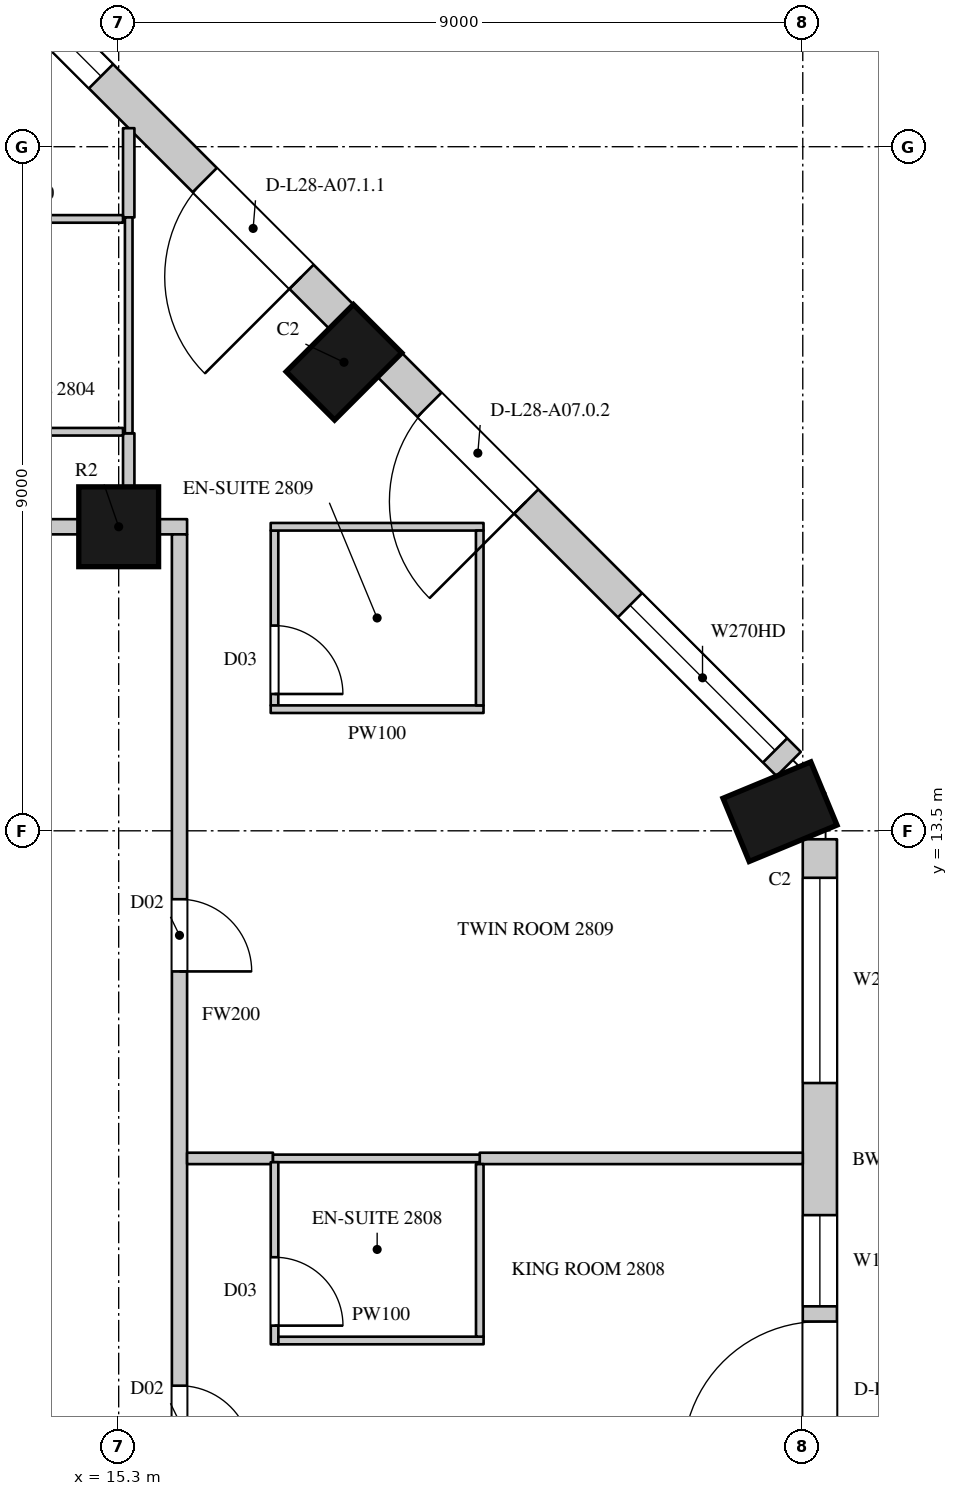
"""IFC4 building model, lengths in metres.
Left out: names, types, materials, properties, quantities, classifications, styles, units other than length and angle.
Written with IfcOpenShell. Run it as: python <this file> out.ifc"""

import sys

from ifc_helpers import new_model, si_unit, direction, frame, frame_2d, origin, origin_2d, place, context, subcontext, project, spatial, rectangle, circle, extrude, element, fill, save


model = new_model("IFC4")
c1 = context("Model", 3, precision=1e-05, world=origin(), true_north=direction((0.0, 1.0)))
c2 = subcontext(c1, "Body", "Model", "MODEL_VIEW")
j1 = project(units=[si_unit("LENGTHUNIT", "METRE"), si_unit("PLANEANGLEUNIT", "RADIAN")], contexts=[c1])
p1 = place(None, origin())
s1 = spatial("IfcSite", under=j1, at=p1, CompositionType="ELEMENT")
p2 = place(p1, origin())
s2 = spatial("IfcBuilding", under=s1, at=p2, CompositionType="ELEMENT")
p3 = place(p2, frame((0.0, 0.0, 131.1)))
s3 = spatial("IfcBuildingStorey", under=s2, at=p3, CompositionType="ELEMENT", Elevation=131.1)
for number, where, z_axis, x_axis in (
    (1, (24.0, 13.752, 0.0), (0.0, 0.0, 1.0), (-0.383, 0.924, 0.0)),
    (2, (18.264, 19.664, 0.0), (0.0, 0.0, 1.0), (-0.707, 0.707, 0.0)),
):
    element("IfcColumn", number, at=place(p3, frame(where, z_axis=z_axis, x_axis=x_axis)), inside=s3, PredefinedType="COLUMN", context=c2, shape_type="SweptSolid", body=[
        extrude(rectangle(XDim=0.9, YDim=1.25, at=origin_2d()), origin(), (0.0, 0.0, 1.0), 3.6),
    ])
p4 = place(p3, frame((15.3, 17.5, 0.0), z_axis=(0.0, 0.0, 1.0), x_axis=(1.0, 0.0, 0.0)))
e3 = element("IfcColumn", 3, at=p4, inside=s3, PredefinedType="COLUMN", context=c2, shape_type="SweptSolid", body=[
    extrude(circle(Radius=0.525, at=origin_2d()), origin(), (0.0, 0.0, 1.0), 3.6),
])
p5 = place(p3, frame((24.525, 4.95, 0.0), z_axis=(0.0, 0.0, 1.0), x_axis=(0.0, 1.0, 0.0)))
e4 = element("IfcWall", 4, at=p5, inside=s3, PredefinedType="SOLIDWALL", context=c2, shape_type="SweptSolid", body=[
    extrude(rectangle(XDim=8.439, YDim=0.45, at=frame_2d((4.219, 0.0))), origin(), (0.0, 0.0, 1.0), 3.3),
])
p6 = place(p5, frame((0.294, 0.0, 0.0)))
e5 = element("IfcOpeningElement", 5, at=p6, cuts=e4, PredefinedType="OPENING", context=c2, shape_type="SweptSolid", body=[
    extrude(rectangle(XDim=1.8, YDim=2.4, at=frame_2d((0.9, 1.2))), frame((0.0, 0.235, 0.0), z_axis=(0.0, -1.0, 0.0), x_axis=(1.0, 0.0, 0.0)), (0.0, 0.0, 1.0), 0.47),
])
p7 = place(p5, frame((2.294, 0.0, 1.05)))
e6 = element("IfcOpeningElement", 6, at=p7, cuts=e4, PredefinedType="OPENING", context=c2, shape_type="SweptSolid", body=[
    extrude(rectangle(XDim=1.2, YDim=2.0, at=frame_2d((0.6, 1.0))), frame((0.0, 0.235, 0.0), z_axis=(0.0, -1.0, 0.0), x_axis=(1.0, 0.0, 0.0)), (0.0, 0.0, 1.0), 0.47),
])
p8 = place(p5, frame((5.232, 0.0, 1.05)))
e7 = element("IfcOpeningElement", 7, at=p8, cuts=e4, PredefinedType="OPENING", context=c2, shape_type="SweptSolid", body=[
    extrude(rectangle(XDim=2.7, YDim=2.0, at=frame_2d((1.35, 1.0))), frame((0.0, 0.235, 0.0), z_axis=(0.0, -1.0, 0.0), x_axis=(1.0, 0.0, 0.0)), (0.0, 0.0, 1.0), 0.47),
])
p9 = place(p3, frame((24.115, 14.379, 0.0), z_axis=(0.0, 0.0, 1.0), x_axis=(-0.707106781187, 0.707106781187, 0.0)))
e8 = element("IfcWall", 8, at=p9, inside=s3, PredefinedType="SOLIDWALL", context=c2, shape_type="SweptSolid", body=[
    extrude(rectangle(XDim=7.424, YDim=0.45, at=frame_2d((3.712, 0.0))), origin(), (0.0, 0.0, 1.0), 3.3),
])
p10 = place(p9, frame((0.253, 0.0, 1.05)))
e9 = element("IfcOpeningElement", 9, at=p10, cuts=e8, PredefinedType="OPENING", context=c2, shape_type="SweptSolid", body=[
    extrude(rectangle(XDim=2.7, YDim=2.0, at=frame_2d((1.35, 1.0))), frame((0.0, 0.235, 0.0), z_axis=(0.0, -1.0, 0.0), x_axis=(1.0, 0.0, 0.0)), (0.0, 0.0, 1.0), 0.47),
])
p11 = place(p9, frame((4.884, 0.0, 0.0)))
e10 = element("IfcOpeningElement", 10, at=p11, cuts=e8, PredefinedType="OPENING", context=c2, shape_type="SweptSolid", body=[
    extrude(rectangle(XDim=1.8, YDim=2.4, at=frame_2d((0.9, 1.2))), frame((0.0, 0.235, 0.0), z_axis=(0.0, -1.0, 0.0), x_axis=(1.0, 0.0, 0.0)), (0.0, 0.0, 1.0), 0.47),
])
p12 = place(p3, frame((18.229, 20.265, 0.0), z_axis=(0.0, 0.0, 1.0), x_axis=(-0.707106781187, 0.707106781187, 0.0)))
e11 = element("IfcWall", 11, at=p12, inside=s3, PredefinedType="SOLIDWALL", context=c2, shape_type="SweptSolid", body=[
    extrude(rectangle(XDim=7.424, YDim=0.45, at=frame_2d((3.712, 0.0))), origin(), (0.0, 0.0, 1.0), 3.3),
])
p13 = place(p12, frame((0.74, 0.0, 0.0)))
e12 = element("IfcOpeningElement", 12, at=p13, cuts=e11, PredefinedType="OPENING", context=c2, shape_type="SweptSolid", body=[
    extrude(rectangle(XDim=1.8, YDim=2.4, at=frame_2d((0.9, 1.2))), frame((0.0, 0.235, 0.0), z_axis=(0.0, -1.0, 0.0), x_axis=(1.0, 0.0, 0.0)), (0.0, 0.0, 1.0), 0.47),
])
p14 = place(p12, frame((4.471, 0.0, 1.05)))
e13 = element("IfcOpeningElement", 13, at=p14, cuts=e11, PredefinedType="OPENING", context=c2, shape_type="SweptSolid", body=[
    extrude(rectangle(XDim=2.7, YDim=2.0, at=frame_2d((1.35, 1.0))), frame((0.0, 0.235, 0.0), z_axis=(0.0, -1.0, 0.0), x_axis=(1.0, 0.0, 0.0)), (0.0, 0.0, 1.0), 0.47),
])
p15 = place(p3, frame((23.15, 16.864, 0.0), z_axis=(0.0, 0.0, 1.0), x_axis=(-0.707106781187, 0.707106781187, 0.0)))
e14 = element("IfcWall", 14, at=p15, inside=s3, PredefinedType="SOLIDWALL", context=c2, shape_type="SweptSolid", body=[
    extrude(rectangle(XDim=1.445, YDim=0.45, at=frame_2d((0.722, 0.0))), origin(), (0.0, 0.0, 1.0), 0.6),
])
p16 = place(p3, frame((19.937, 20.078, 0.0), z_axis=(0.0, 0.0, 1.0), x_axis=(-0.707106781187, 0.707106781187, 0.0)))
e15 = element("IfcWall", 15, at=p16, inside=s3, PredefinedType="SOLIDWALL", context=c2, shape_type="SweptSolid", body=[
    extrude(rectangle(XDim=1.781, YDim=0.45, at=frame_2d((0.89, 0.0))), origin(), (0.0, 0.0, 1.0), 0.6),
])
p17 = place(p3, frame((16.486, 23.529, 0.0), z_axis=(0.0, 0.0, 1.0), x_axis=(-0.707022305137, 0.707191247145, 0.0)))
e16 = element("IfcWall", 16, at=p17, inside=s3, PredefinedType="SOLIDWALL", context=c2, shape_type="SweptSolid", body=[
    extrude(rectangle(XDim=1.445, YDim=0.45, at=frame_2d((0.723, 0.0))), origin(), (0.0, 0.0, 1.0), 0.6),
])
p18 = place(p3, frame((6.825, 17.5, 0.0), z_axis=(0.0, 0.0, 1.0), x_axis=(1.0, 0.0, 0.0)))
e17 = element("IfcWall", 17, at=p18, inside=s3, PredefinedType="PARTITIONING", context=c2, shape_type="SweptSolid", body=[
    extrude(rectangle(XDim=7.95, YDim=0.2, at=frame_2d((3.975, 0.0))), origin(), (0.0, 0.0, 1.0), 2.75),
])
p19 = place(p18, frame((1.55, 0.0, 0.0)))
e18 = element("IfcOpeningElement", 18, at=p19, cuts=e17, PredefinedType="OPENING", context=c2, shape_type="SweptSolid", body=[
    extrude(rectangle(XDim=1.1, YDim=2.4, at=frame_2d((0.55, 1.2))), frame((0.0, 0.11, 0.0), z_axis=(0.0, -1.0, 0.0), x_axis=(1.0, 0.0, 0.0)), (0.0, 0.0, 1.0), 0.22),
])
p20 = place(p3, frame((15.825, 17.5, 0.0), z_axis=(0.0, 0.0, 1.0), x_axis=(1.0, 0.0, 0.0)))
e19 = element("IfcWall", 19, at=p20, inside=s3, PredefinedType="PARTITIONING", context=c2, shape_type="SweptSolid", body=[
    extrude(rectangle(XDim=0.375, YDim=0.2, at=frame_2d((0.188, 0.0))), origin(), (0.0, 0.0, 1.0), 3.3),
])
p21 = place(p3, frame((16.1, 4.75, 0.0), z_axis=(0.0, 0.0, 1.0), x_axis=(0.0, 1.0, 0.0)))
e20 = element("IfcWall", 20, at=p21, inside=s3, PredefinedType="PARTITIONING", context=c2, shape_type="SweptSolid", body=[
    extrude(rectangle(XDim=12.65, YDim=0.2, at=frame_2d((6.325, 0.0))), origin(), (0.0, 0.0, 1.0), 3.3),
])
p22 = place(p21, frame((0.5, 0.0, 0.0)))
e21 = element("IfcOpeningElement", 21, at=p22, cuts=e20, PredefinedType="OPENING", context=c2, shape_type="SweptSolid", body=[
    extrude(rectangle(XDim=0.95, YDim=2.2, at=frame_2d((0.475, 1.1))), frame((0.0, 0.11, 0.0), z_axis=(0.0, -1.0, 0.0), x_axis=(1.0, 0.0, 0.0)), (0.0, 0.0, 1.0), 0.22),
])
p23 = place(p21, frame((6.9, 0.0, 0.0)))
e22 = element("IfcOpeningElement", 22, at=p23, cuts=e20, PredefinedType="OPENING", context=c2, shape_type="SweptSolid", body=[
    extrude(rectangle(XDim=0.95, YDim=2.2, at=frame_2d((0.475, 1.1))), frame((0.0, 0.11, 0.0), z_axis=(0.0, -1.0, 0.0), x_axis=(1.0, 0.0, 0.0)), (0.0, 0.0, 1.0), 0.22),
])
p24 = place(p3, frame((15.432, 18.016, 0.0), z_axis=(0.0, 0.0, 1.0), x_axis=(0.0, 1.0, 0.0)))
e23 = element("IfcWall", 23, at=p24, inside=s3, PredefinedType="PARTITIONING", context=c2, shape_type="SweptSolid", body=[
    extrude(rectangle(XDim=0.714, YDim=0.15, at=frame_2d((0.357, 0.0))), origin(), (0.0, 0.0, 1.0), 3.3),
])
p25 = place(p3, frame((15.432, 21.57, 0.0), z_axis=(0.0, 0.0, 1.0), x_axis=(0.0, 1.0, 0.0)))
e24 = element("IfcWall", 24, at=p25, inside=s3, PredefinedType="PARTITIONING", context=c2, shape_type="SweptSolid", body=[
    extrude(rectangle(XDim=1.174, YDim=0.15, at=frame_2d((0.587, 0.0))), origin(), (0.0, 0.0, 1.0), 3.3),
])
p26 = place(p3, frame((16.2, 9.19, 0.0), z_axis=(0.0, 0.0, 1.0), x_axis=(1.0, 0.0, 0.0)))
e25 = element("IfcWall", 25, at=p26, inside=s3, PredefinedType="PARTITIONING", context=c2, shape_type="SweptSolid", body=[
    extrude(rectangle(XDim=1.13, YDim=0.15, at=frame_2d((0.565, 0.0))), origin(), (0.0, 0.0, 1.0), 2.65),
])
p27 = place(p3, frame((20.05, 9.19, 0.0), z_axis=(0.0, 0.0, 1.0), x_axis=(1.0, 0.0, 0.0)))
e26 = element("IfcWall", 26, at=p27, inside=s3, PredefinedType="PARTITIONING", context=c2, shape_type="SweptSolid", body=[
    extrude(rectangle(XDim=4.25, YDim=0.15, at=frame_2d((2.125, 0.0))), origin(), (0.0, 0.0, 1.0), 2.65),
])
for number, where, z_axis, x_axis in (
    (27, (12.786, 18.75, 0.0), (0.0, 0.0, 1.0), (1.0, 0.0, 0.0)),
    (28, (12.786, 21.55, 0.0), (0.0, 0.0, 1.0), (1.0, 0.0, 0.0)),
):
    element("IfcWall", number, at=place(p3, frame(where, z_axis=z_axis, x_axis=x_axis)), inside=s3, PredefinedType="PARTITIONING", context=c2, shape_type="SweptSolid", body=[
        extrude(rectangle(XDim=2.571, YDim=0.1, at=frame_2d((1.286, 0.0))), origin(), (0.0, 0.0, 1.0), 3.3),
    ])
p28 = place(p3, frame((15.432, 18.73, 0.0), z_axis=(0.0, 0.0, 1.0), x_axis=(0.0, 1.0, 0.0)))
e29 = element("IfcWall", 29, at=p28, inside=s3, PredefinedType="PARTITIONING", context=c2, shape_type="SweptSolid", body=[
    extrude(rectangle(XDim=2.84, YDim=0.1, at=frame_2d((1.42, 0.0))), origin(), (0.0, 0.0, 1.0), 3.3),
])
p29 = place(p3, frame((17.33, 9.19, 0.0), z_axis=(0.0, 0.0, 1.0), x_axis=(1.0, 0.0, 0.0)))
e30 = element("IfcWall", 30, at=p29, inside=s3, PredefinedType="PARTITIONING", context=c2, shape_type="SweptSolid", body=[
    extrude(rectangle(XDim=2.72, YDim=0.1, at=frame_2d((1.36, 0.0))), origin(), (0.0, 0.0, 1.0), 2.65),
])
p30 = place(p3, frame((17.35, 9.14, 0.0), z_axis=(0.0, 0.0, 1.0), x_axis=(0.000407580973, -0.999999916939, 0.0)))
e31 = element("IfcWall", 31, at=p30, inside=s3, PredefinedType="PARTITIONING", context=c2, shape_type="SweptSolid", body=[
    extrude(rectangle(XDim=2.396, YDim=0.1, at=frame_2d((1.198, 0.0))), origin(), (0.0, 0.0, 1.0), 3.3),
])
p31 = place(p30, frame((1.25, 0.0, 0.0)))
e32 = element("IfcOpeningElement", 32, at=p31, cuts=e31, PredefinedType="OPENING", context=c2, shape_type="SweptSolid", body=[
    extrude(rectangle(XDim=0.9, YDim=2.2, at=frame_2d((0.45, 1.1))), frame((0.0, 0.06, 0.0), z_axis=(0.0, -1.0, 0.0), x_axis=(1.0, 0.0, 0.0)), (0.0, 0.0, 1.0), 0.12),
])
p32 = place(p3, frame((17.35, 15.15, 0.0), z_axis=(0.0, 0.0, 1.0), x_axis=(0.0, 1.0, 0.0)))
e33 = element("IfcWall", 33, at=p32, inside=s3, PredefinedType="PARTITIONING", context=c2, shape_type="SweptSolid", body=[
    extrude(rectangle(XDim=2.3, YDim=0.1, at=frame_2d((1.15, 0.0))), origin(), (0.0, 0.0, 1.0), 3.3),
])
p33 = place(p32, frame((0.15, 0.0, 0.0)))
e34 = element("IfcOpeningElement", 34, at=p33, cuts=e33, PredefinedType="OPENING", context=c2, shape_type="SweptSolid", body=[
    extrude(rectangle(XDim=0.9, YDim=2.2, at=frame_2d((0.45, 1.1))), frame((0.0, 0.06, 0.0), z_axis=(0.0, -1.0, 0.0), x_axis=(1.0, 0.0, 0.0)), (0.0, 0.0, 1.0), 0.12),
])
for number, where, z_axis, x_axis in (
    (35, (17.3, 15.1, 0.0), (0.0, 0.0, 1.0), (1.0, 0.0, 0.0)),
    (36, (17.3, 17.5, 0.0), (0.0, 0.0, 1.0), (1.0, 0.0, 0.0)),
):
    element("IfcWall", number, at=place(p3, frame(where, z_axis=z_axis, x_axis=x_axis)), inside=s3, PredefinedType="PARTITIONING", context=c2, shape_type="SweptSolid", body=[
        extrude(rectangle(XDim=2.8, YDim=0.1, at=frame_2d((1.4, 0.0))), origin(), (0.0, 0.0, 1.0), 3.3),
    ])
p34 = place(p3, frame((17.401, 6.794, 0.0), z_axis=(0.0, 0.0, 1.0), x_axis=(0.9999999346, 0.000361663629, 0.0)))
e37 = element("IfcWall", 37, at=p34, inside=s3, PredefinedType="PARTITIONING", context=c2, shape_type="SweptSolid", body=[
    extrude(rectangle(XDim=2.7, YDim=0.1, at=frame_2d((1.35, 0.0))), origin(), (0.0, 0.0, 1.0), 3.3),
])
p35 = place(p3, frame((20.05, 9.115, 0.0), z_axis=(0.0, 0.0, 1.0), x_axis=(0.000430200003, -0.999999907464, 0.0)))
e38 = element("IfcWall", 38, at=p35, inside=s3, PredefinedType="PARTITIONING", context=c2, shape_type="SweptSolid", body=[
    extrude(rectangle(XDim=2.27, YDim=0.1, at=frame_2d((1.135, 0.0))), origin(), (0.0, 0.0, 1.0), 3.3),
])
p36 = place(p3, frame((20.05, 15.15, 0.0), z_axis=(0.0, 0.0, 1.0), x_axis=(0.0, 1.0, 0.0)))
e39 = element("IfcWall", 39, at=p36, inside=s3, PredefinedType="PARTITIONING", context=c2, shape_type="SweptSolid", body=[
    extrude(rectangle(XDim=2.3, YDim=0.1, at=frame_2d((1.15, 0.0))), origin(), (0.0, 0.0, 1.0), 3.3),
])
p37 = place(p6, origin())
e40 = element("IfcDoor", 40, at=p37, inside=s3, OperationType="SLIDING_TO_LEFT", PredefinedType="DOOR", context=c2, shape_type="SweptSolid", body=[
    extrude(rectangle(XDim=1.8, YDim=2.4, at=frame_2d((0.9, 1.2))), frame((0.0, 0.13, 0.0), z_axis=(0.0, -1.0, 0.0), x_axis=(1.0, 0.0, 0.0)), (0.0, 0.0, 1.0), 0.05),
])
fill(e5, e40)
p38 = place(p7, origin())
e41 = element("IfcWindow", 41, at=p38, inside=s3, PartitioningType="SINGLE_PANEL", PredefinedType="WINDOW", context=c2, shape_type="SweptSolid", body=[
    extrude(rectangle(XDim=1.2, YDim=2.0, at=frame_2d((0.6, 1.0))), frame((0.0, 0.135, 0.0), z_axis=(0.0, -1.0, 0.0), x_axis=(1.0, 0.0, 0.0)), (0.0, 0.0, 1.0), 0.06),
])
fill(e6, e41)
p39 = place(p8, origin())
e42 = element("IfcWindow", 42, at=p39, inside=s3, PartitioningType="SINGLE_PANEL", PredefinedType="WINDOW", context=c2, shape_type="SweptSolid", body=[
    extrude(rectangle(XDim=2.7, YDim=2.0, at=frame_2d((1.35, 1.0))), frame((0.0, 0.135, 0.0), z_axis=(0.0, -1.0, 0.0), x_axis=(1.0, 0.0, 0.0)), (0.0, 0.0, 1.0), 0.06),
])
fill(e7, e42)
p40 = place(p10, origin())
e43 = element("IfcWindow", 43, at=p40, inside=s3, PartitioningType="SINGLE_PANEL", PredefinedType="WINDOW", context=c2, shape_type="SweptSolid", body=[
    extrude(rectangle(XDim=2.7, YDim=2.0, at=frame_2d((1.35, 1.0))), frame((0.0, 0.135, 0.0), z_axis=(0.0, -1.0, 0.0), x_axis=(1.0, 0.0, 0.0)), (0.0, 0.0, 1.0), 0.06),
])
fill(e9, e43)
p41 = place(p11, origin())
e44 = element("IfcDoor", 44, at=p41, inside=s3, OperationType="SLIDING_TO_LEFT", PredefinedType="DOOR", context=c2, shape_type="SweptSolid", body=[
    extrude(rectangle(XDim=1.8, YDim=2.4, at=frame_2d((0.9, 1.2))), frame((0.0, 0.13, 0.0), z_axis=(0.0, -1.0, 0.0), x_axis=(1.0, 0.0, 0.0)), (0.0, 0.0, 1.0), 0.05),
])
fill(e10, e44)
p42 = place(p13, origin())
e45 = element("IfcDoor", 45, at=p42, inside=s3, OperationType="SLIDING_TO_LEFT", PredefinedType="DOOR", context=c2, shape_type="SweptSolid", body=[
    extrude(rectangle(XDim=1.8, YDim=2.4, at=frame_2d((0.9, 1.2))), frame((0.0, 0.13, 0.0), z_axis=(0.0, -1.0, 0.0), x_axis=(1.0, 0.0, 0.0)), (0.0, 0.0, 1.0), 0.05),
])
fill(e12, e45)
p43 = place(p14, origin())
e46 = element("IfcWindow", 46, at=p43, inside=s3, PartitioningType="SINGLE_PANEL", PredefinedType="WINDOW", context=c2, shape_type="SweptSolid", body=[
    extrude(rectangle(XDim=2.7, YDim=2.0, at=frame_2d((1.35, 1.0))), frame((0.0, 0.135, 0.0), z_axis=(0.0, -1.0, 0.0), x_axis=(1.0, 0.0, 0.0)), (0.0, 0.0, 1.0), 0.06),
])
fill(e13, e46)
p44 = place(p22, origin())
e47 = element("IfcDoor", 47, at=p44, inside=s3, OperationType="SINGLE_SWING_RIGHT", PredefinedType="DOOR", context=c2, shape_type="SweptSolid", body=[
    extrude(rectangle(XDim=0.95, YDim=2.2, at=frame_2d((0.475, 1.1))), frame((0.0, 0.025, 0.0), z_axis=(0.0, -1.0, 0.0), x_axis=(1.0, 0.0, 0.0)), (0.0, 0.0, 1.0), 0.05),
])
fill(e21, e47)
p45 = place(p31, origin())
e48 = element("IfcDoor", 48, at=p45, inside=s3, OperationType="SINGLE_SWING_RIGHT", PredefinedType="DOOR", context=c2, shape_type="SweptSolid", body=[
    extrude(rectangle(XDim=0.9, YDim=2.2, at=frame_2d((0.45, 1.1))), frame((0.0, 0.025, 0.0), z_axis=(0.0, -1.0, 0.0), x_axis=(1.0, 0.0, 0.0)), (0.0, 0.0, 1.0), 0.05),
])
fill(e32, e48)
p46 = place(p23, origin())
e49 = element("IfcDoor", 49, at=p46, inside=s3, OperationType="SINGLE_SWING_RIGHT", PredefinedType="DOOR", context=c2, shape_type="SweptSolid", body=[
    extrude(rectangle(XDim=0.95, YDim=2.2, at=frame_2d((0.475, 1.1))), frame((0.0, 0.025, 0.0), z_axis=(0.0, -1.0, 0.0), x_axis=(1.0, 0.0, 0.0)), (0.0, 0.0, 1.0), 0.05),
])
fill(e22, e49)
p47 = place(p33, origin())
e50 = element("IfcDoor", 50, at=p47, inside=s3, OperationType="SINGLE_SWING_RIGHT", PredefinedType="DOOR", context=c2, shape_type="SweptSolid", body=[
    extrude(rectangle(XDim=0.9, YDim=2.2, at=frame_2d((0.45, 1.1))), frame((0.0, 0.025, 0.0), z_axis=(0.0, -1.0, 0.0), x_axis=(1.0, 0.0, 0.0)), (0.0, 0.0, 1.0), 0.05),
])
fill(e34, e50)
save(model, sys.argv[1])
